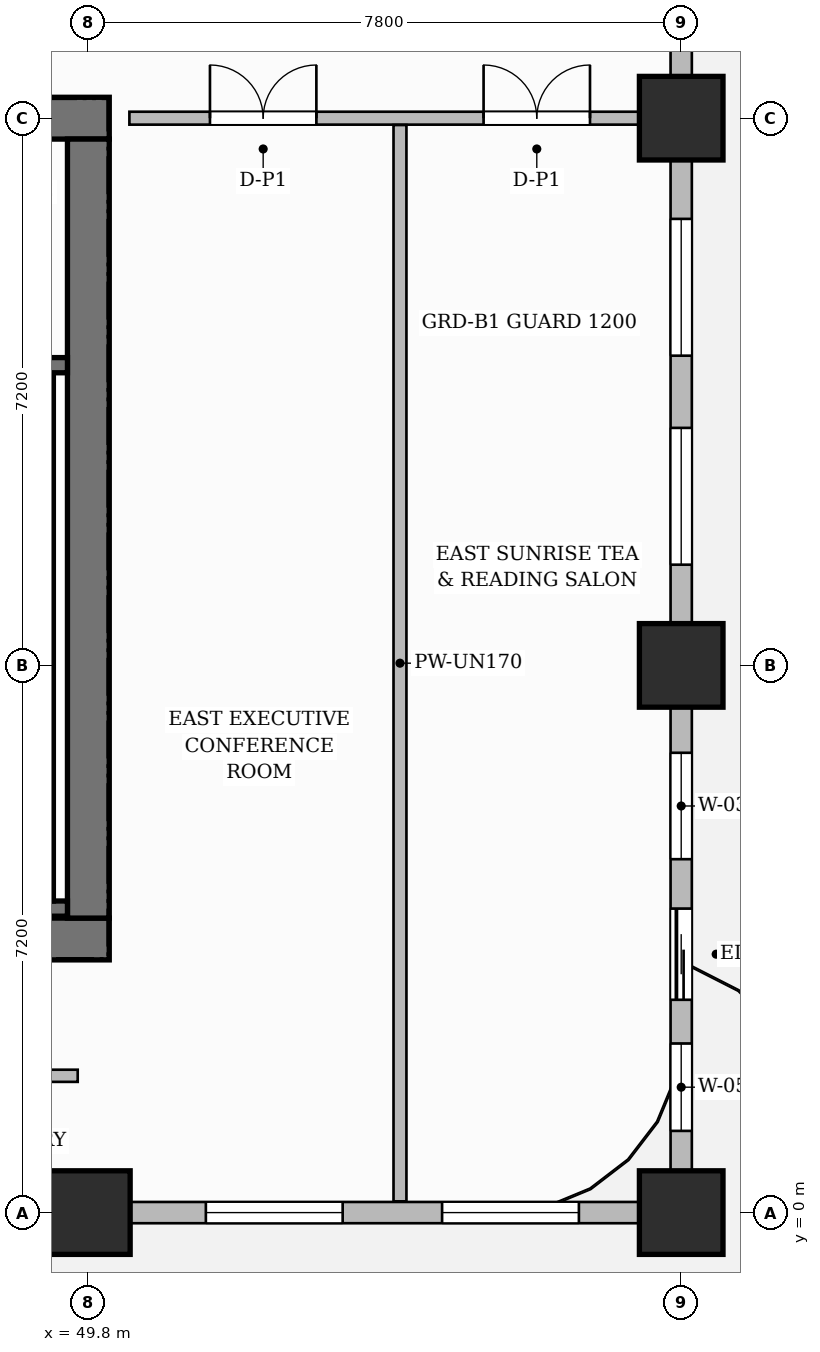
"""IFC4 building model, lengths in metres.
Left out: names, types, materials, properties, quantities, classifications, styles, units other than length and angle.
Written with IfcOpenShell. Run it as: python <this file> out.ifc"""

import sys

from ifc_helpers import new_model, si_unit, direction, frame, frame_2d, origin, origin_2d, place, context, subcontext, project, spatial, rectangle, extrude, source, transform, mapped, element, fill, save


model = new_model("IFC4")
c1 = context("Model", 3, precision=1e-05, world=origin(), true_north=direction((0.0, 1.0)))
c2 = subcontext(c1, "Body", "Model", "MODEL_VIEW")
j1 = project(units=[si_unit("LENGTHUNIT", "METRE"), si_unit("PLANEANGLEUNIT", "RADIAN")], contexts=[c1])
p1 = place(None, origin())
s1 = spatial("IfcSite", under=j1, at=p1, CompositionType="ELEMENT")
p2 = place(p1, origin())
s2 = spatial("IfcBuilding", under=s1, at=p2, CompositionType="ELEMENT")
p3 = place(p2, frame((0.0, 0.0, 102.7)))
s3 = spatial("IfcBuildingStorey", under=s2, at=p3, CompositionType="ELEMENT", Elevation=102.7)
p4 = place(p3, frame((34.525, 3.6, 0.0), z_axis=(0.0, 0.0, 1.0), x_axis=(1.0, 0.0, 0.0)))
e1 = element("IfcWall", 1, at=p4, inside=s3, PredefinedType="SHEAR", context=c2, shape_type="SweptSolid", body=[
    extrude(rectangle(XDim=15.55, YDim=0.55, at=frame_2d((7.775, 0.0))), origin(), (0.0, 0.0, 1.0), 3.7),
])
p5 = place(p4, frame((4.825, 0.0, 0.0)))
e2 = element("IfcOpeningElement", 2, at=p5, cuts=e1, PredefinedType="OPENING", context=c2, shape_type="SweptSolid", body=[
    extrude(rectangle(XDim=0.9, YDim=2.1, at=frame_2d((0.45, 1.05))), frame((0.0, 0.285, 0.0), z_axis=(0.0, -1.0, 0.0), x_axis=(1.0, 0.0, 0.0)), (0.0, 0.0, 1.0), 0.57),
])
p6 = place(p4, frame((7.245, 0.0, 0.0)))
e3 = element("IfcOpeningElement", 3, at=p6, cuts=e1, PredefinedType="OPENING", context=c2, shape_type="SweptSolid", body=[
    extrude(rectangle(XDim=0.9, YDim=2.1, at=frame_2d((0.45, 1.05))), frame((0.0, 0.285, 0.0), z_axis=(0.0, -1.0, 0.0), x_axis=(1.0, 0.0, 0.0)), (0.0, 0.0, 1.0), 0.57),
])
p7 = place(p3, frame((34.525, 14.4, 0.0), z_axis=(0.0, 0.0, 1.0), x_axis=(1.0, 0.0, 0.0)))
e4 = element("IfcWall", 4, at=p7, inside=s3, PredefinedType="SHEAR", context=c2, shape_type="SweptSolid", body=[
    extrude(rectangle(XDim=15.55, YDim=0.55, at=frame_2d((7.775, 0.0))), origin(), (0.0, 0.0, 1.0), 3.7),
])
p8 = place(p7, frame((5.405, 0.0, 0.0)))
e5 = element("IfcOpeningElement", 5, at=p8, cuts=e4, PredefinedType="OPENING", context=c2, shape_type="SweptSolid", body=[
    extrude(rectangle(XDim=1.5, YDim=2.2, at=frame_2d((0.75, 1.1))), frame((0.0, 0.285, 0.0), z_axis=(0.0, -1.0, 0.0), x_axis=(1.0, 0.0, 0.0)), (0.0, 0.0, 1.0), 0.57),
])
p9 = place(p7, frame((1.62, 0.0, 0.0)))
e6 = element("IfcOpeningElement", 6, at=p9, cuts=e4, PredefinedType="OPENING", context=c2, shape_type="SweptSolid", body=[
    extrude(rectangle(XDim=1.05, YDim=2.15, at=frame_2d((0.525, 1.075))), frame((0.0, 0.285, 0.0), z_axis=(0.0, -1.0, 0.0), x_axis=(1.0, 0.0, 0.0)), (0.0, 0.0, 1.0), 0.57),
])
p10 = place(p7, frame((11.25, 0.0, 0.0)))
e7 = element("IfcOpeningElement", 7, at=p10, cuts=e4, PredefinedType="OPENING", context=c2, shape_type="SweptSolid", body=[
    extrude(rectangle(XDim=1.05, YDim=2.15, at=frame_2d((0.525, 1.075))), frame((0.0, 0.285, 0.0), z_axis=(0.0, -1.0, 0.0), x_axis=(1.0, 0.0, 0.0)), (0.0, 0.0, 1.0), 0.57),
])
p11 = place(p3, frame((49.8, 3.875, 0.0), z_axis=(0.0, 0.0, 1.0), x_axis=(0.0, 1.0, 0.0)))
e8 = element("IfcWall", 8, at=p11, inside=s3, PredefinedType="SHEAR", context=c2, shape_type="SweptSolid", body=[
    extrude(rectangle(XDim=10.25, YDim=0.55, at=frame_2d((5.125, 0.0))), origin(), (0.0, 0.0, 1.0), 3.7),
])
m1 = source(origin(), c2, "Body", "SweptSolid", [
    extrude(rectangle(XDim=1.1, YDim=1.1, at=origin_2d()), origin(), (0.0, 0.0, 1.0), 3.7),
])
for number, where, z_axis, x_axis in (
    (9, (49.8, 0.0, 0.0), (0.0, 0.0, 1.0), (1.0, 0.0, 0.0)),
    (10, (57.6, 0.0, 0.0), (0.0, 0.0, 1.0), (1.0, 0.0, 0.0)),
    (11, (57.6, 7.2, 0.0), (0.0, 0.0, 1.0), (1.0, 0.0, 0.0)),
    (12, (57.6, 14.4, 0.0), (0.0, 0.0, 1.0), (1.0, 0.0, 0.0)),
):
    element("IfcColumn", number, at=place(p3, frame(where, z_axis=z_axis, x_axis=x_axis)), inside=s3, PredefinedType="COLUMN", context=c2, shape_type="MappedRepresentation", body=[
        mapped(m1, transform((0.0, 0.0, 0.0), scale=1.0)),
    ])
p12 = place(p3, frame((43.12, 4.0, 0.0), z_axis=(0.0, 0.0, 1.0), x_axis=(1.0, 0.0, 0.0)))
e13 = element("IfcWall", 13, at=p12, inside=s3, PredefinedType="SHEAR", context=c2, shape_type="SweptSolid", body=[
    extrude(rectangle(XDim=6.405, YDim=0.2, at=frame_2d((3.202, 0.0))), origin(), (0.0, 0.0, 1.0), 3.7),
])
p13 = place(p3, frame((49.24, 4.1, 0.0), z_axis=(0.0, 0.0, 1.0), x_axis=(0.0, 1.0, 0.0)))
e14 = element("IfcWall", 14, at=p13, inside=s3, PredefinedType="SHEAR", context=c2, shape_type="SweptSolid", body=[
    extrude(rectangle(XDim=6.95, YDim=0.2, at=frame_2d((3.475, 0.0))), origin(), (0.0, 0.0, 1.0), 3.7),
])
p14 = place(p3, frame((43.12, 11.15, 0.0), z_axis=(0.0, 0.0, 1.0), x_axis=(1.0, 0.0, 0.0)))
e15 = element("IfcWall", 15, at=p14, inside=s3, PredefinedType="SHEAR", context=c2, shape_type="SweptSolid", body=[
    extrude(rectangle(XDim=6.405, YDim=0.2, at=frame_2d((3.202, 0.0))), origin(), (0.0, 0.0, 1.0), 3.7),
])
p15 = place(p14, frame((1.045, 0.0, 0.0)))
e16 = element("IfcOpeningElement", 16, at=p15, cuts=e15, PredefinedType="OPENING", context=c2, shape_type="SweptSolid", body=[
    extrude(rectangle(XDim=1.05, YDim=2.2, at=frame_2d((0.525, 1.1))), frame((0.0, 0.11, 0.0), z_axis=(0.0, -1.0, 0.0), x_axis=(1.0, 0.0, 0.0)), (0.0, 0.0, 1.0), 0.22),
])
p16 = place(p14, frame((4.125, 0.0, 0.0)))
e17 = element("IfcOpeningElement", 17, at=p16, cuts=e15, PredefinedType="OPENING", context=c2, shape_type="SweptSolid", body=[
    extrude(rectangle(XDim=1.05, YDim=2.2, at=frame_2d((0.525, 1.1))), frame((0.0, 0.11, 0.0), z_axis=(0.0, -1.0, 0.0), x_axis=(1.0, 0.0, 0.0)), (0.0, 0.0, 1.0), 0.22),
])
p17 = place(p3, frame((30.29, 1.8, 0.0), z_axis=(0.0, 0.0, 1.0), x_axis=(1.0, 0.0, 0.0)))
e18 = element("IfcWall", 18, at=p17, inside=s3, PredefinedType="PARTITIONING", context=c2, shape_type="SweptSolid", body=[
    extrude(rectangle(XDim=19.37, YDim=0.16, at=frame_2d((9.685, 0.0))), origin(), (0.0, 0.0, 1.0), 3.4),
])
p18 = place(p17, frame((5.213, 0.0, 0.0)))
e19 = element("IfcOpeningElement", 19, at=p18, cuts=e18, PredefinedType="OPENING", context=c2, shape_type="SweptSolid", body=[
    extrude(rectangle(XDim=0.9, YDim=2.15, at=frame_2d((0.45, 1.075))), frame((0.0, 0.09, 0.0), z_axis=(0.0, -1.0, 0.0), x_axis=(1.0, 0.0, 0.0)), (0.0, 0.0, 1.0), 0.18),
])
p19 = place(p17, frame((14.06, 0.0, 0.0)))
e20 = element("IfcOpeningElement", 20, at=p19, cuts=e18, PredefinedType="OPENING", context=c2, shape_type="SweptSolid", body=[
    extrude(rectangle(XDim=0.9, YDim=2.15, at=frame_2d((0.45, 1.075))), frame((0.0, 0.09, 0.0), z_axis=(0.0, -1.0, 0.0), x_axis=(1.0, 0.0, 0.0)), (0.0, 0.0, 1.0), 0.18),
])
p20 = place(p3, frame((50.34, 14.4, 0.0), z_axis=(0.0, 0.0, 1.0), x_axis=(1.0, 0.0, 0.0)))
e21 = element("IfcWall", 21, at=p20, inside=s3, PredefinedType="PARTITIONING", context=c2, shape_type="SweptSolid", body=[
    extrude(rectangle(XDim=7.07, YDim=0.17, at=frame_2d((3.535, 0.0))), origin(), (0.0, 0.0, 1.0), 2.835),
])
p21 = place(p20, frame((1.06, 0.0, 0.0)))
e22 = element("IfcOpeningElement", 22, at=p21, cuts=e21, PredefinedType="OPENING", context=c2, shape_type="SweptSolid", body=[
    extrude(rectangle(XDim=1.4, YDim=2.35, at=frame_2d((0.7, 1.175))), frame((0.0, 0.095, 0.0), z_axis=(0.0, -1.0, 0.0), x_axis=(1.0, 0.0, 0.0)), (0.0, 0.0, 1.0), 0.19),
])
p22 = place(p20, frame((4.66, 0.0, 0.0)))
e23 = element("IfcOpeningElement", 23, at=p22, cuts=e21, PredefinedType="OPENING", context=c2, shape_type="SweptSolid", body=[
    extrude(rectangle(XDim=1.4, YDim=2.35, at=frame_2d((0.7, 1.175))), frame((0.0, 0.095, 0.0), z_axis=(0.0, -1.0, 0.0), x_axis=(1.0, 0.0, 0.0)), (0.0, 0.0, 1.0), 0.19),
])
p23 = place(p3, frame((53.9, 0.148, 0.0), z_axis=(0.0, 0.0, 1.0), x_axis=(0.0, 1.0, 0.0)))
e24 = element("IfcWall", 24, at=p23, inside=s3, PredefinedType="PARTITIONING", context=c2, shape_type="SweptSolid", body=[
    extrude(rectangle(XDim=14.162, YDim=0.17, at=frame_2d((7.081, 0.0))), origin(), (0.0, 0.0, 1.0), 3.025),
])
p24 = place(p3, frame((14.4, 0.0, 0.0), z_axis=(0.0, 0.0, 1.0), x_axis=(1.0, 0.0, 0.0)))
e25 = element("IfcWall", 25, at=p24, inside=s3, PredefinedType="SOLIDWALL", context=c2, shape_type="SweptSolid", body=[
    extrude(rectangle(XDim=43.2, YDim=0.28, at=frame_2d((21.6, 0.0))), origin(), (0.0, 0.0, 1.0), 2.835),
])
p25 = place(p24, frame((0.85, 0.0, 0.0)))
e26 = element("IfcOpeningElement", 26, at=p25, cuts=e25, PredefinedType="OPENING", context=c2, shape_type="SweptSolid", body=[
    extrude(rectangle(XDim=1.2, YDim=2.2, at=frame_2d((0.6, 1.1))), frame((0.0, 0.15, 0.0), z_axis=(0.0, -1.0, 0.0), x_axis=(1.0, 0.0, 0.0)), (0.0, 0.0, 1.0), 0.3),
])
p26 = place(p24, frame((2.746, 0.0, 0.8)))
e27 = element("IfcOpeningElement", 27, at=p26, cuts=e25, PredefinedType="OPENING", context=c2, shape_type="SweptSolid", body=[
    extrude(rectangle(XDim=1.15, YDim=1.8, at=frame_2d((0.575, 0.9))), frame((0.0, 0.15, 0.0), z_axis=(0.0, -1.0, 0.0), x_axis=(1.0, 0.0, 0.0)), (0.0, 0.0, 1.0), 0.3),
])
p27 = place(p24, frame((4.654, 0.0, 0.8)))
e28 = element("IfcOpeningElement", 28, at=p27, cuts=e25, PredefinedType="OPENING", context=c2, shape_type="SweptSolid", body=[
    extrude(rectangle(XDim=1.4, YDim=1.85, at=frame_2d((0.7, 0.925))), frame((0.0, 0.15, 0.0), z_axis=(0.0, -1.0, 0.0), x_axis=(1.0, 0.0, 0.0)), (0.0, 0.0, 1.0), 0.3),
])
p28 = place(p24, frame((8.181, 0.0, 0.8)))
e29 = element("IfcOpeningElement", 29, at=p28, cuts=e25, PredefinedType="OPENING", context=c2, shape_type="SweptSolid", body=[
    extrude(rectangle(XDim=0.95, YDim=1.75, at=frame_2d((0.475, 0.875))), frame((0.0, 0.15, 0.0), z_axis=(0.0, -1.0, 0.0), x_axis=(1.0, 0.0, 0.0)), (0.0, 0.0, 1.0), 0.3),
])
p29 = place(p24, frame((10.564, 0.0, 0.8)))
e30 = element("IfcOpeningElement", 30, at=p29, cuts=e25, PredefinedType="OPENING", context=c2, shape_type="SweptSolid", body=[
    extrude(rectangle(XDim=1.8, YDim=1.85, at=frame_2d((0.9, 0.925))), frame((0.0, 0.15, 0.0), z_axis=(0.0, -1.0, 0.0), x_axis=(1.0, 0.0, 0.0)), (0.0, 0.0, 1.0), 0.3),
])
p30 = place(p24, frame((16.804, 0.0, 0.8)))
e31 = element("IfcOpeningElement", 31, at=p30, cuts=e25, PredefinedType="OPENING", context=c2, shape_type="SweptSolid", body=[
    extrude(rectangle(XDim=1.8, YDim=1.85, at=frame_2d((0.9, 0.925))), frame((0.0, 0.15, 0.0), z_axis=(0.0, -1.0, 0.0), x_axis=(1.0, 0.0, 0.0)), (0.0, 0.0, 1.0), 0.3),
])
p31 = place(p24, frame((22.396, 0.0, 0.8)))
e32 = element("IfcOpeningElement", 32, at=p31, cuts=e25, PredefinedType="OPENING", context=c2, shape_type="SweptSolid", body=[
    extrude(rectangle(XDim=1.8, YDim=1.85, at=frame_2d((0.9, 0.925))), frame((0.0, 0.15, 0.0), z_axis=(0.0, -1.0, 0.0), x_axis=(1.0, 0.0, 0.0)), (0.0, 0.0, 1.0), 0.3),
])
p32 = place(p24, frame((25.629, 0.0, 0.8)))
e33 = element("IfcOpeningElement", 33, at=p32, cuts=e25, PredefinedType="OPENING", context=c2, shape_type="SweptSolid", body=[
    extrude(rectangle(XDim=0.95, YDim=1.75, at=frame_2d((0.475, 0.875))), frame((0.0, 0.15, 0.0), z_axis=(0.0, -1.0, 0.0), x_axis=(1.0, 0.0, 0.0)), (0.0, 0.0, 1.0), 0.3),
])
p33 = place(p24, frame((29.075, 0.0, 0.8)))
e34 = element("IfcOpeningElement", 34, at=p33, cuts=e25, PredefinedType="OPENING", context=c2, shape_type="SweptSolid", body=[
    extrude(rectangle(XDim=1.8, YDim=1.85, at=frame_2d((0.9, 0.925))), frame((0.0, 0.15, 0.0), z_axis=(0.0, -1.0, 0.0), x_axis=(1.0, 0.0, 0.0)), (0.0, 0.0, 1.0), 0.3),
])
p34 = place(p24, frame((32.125, 0.0, 0.8)))
e35 = element("IfcOpeningElement", 35, at=p34, cuts=e25, PredefinedType="OPENING", context=c2, shape_type="SweptSolid", body=[
    extrude(rectangle(XDim=1.8, YDim=1.85, at=frame_2d((0.9, 0.925))), frame((0.0, 0.15, 0.0), z_axis=(0.0, -1.0, 0.0), x_axis=(1.0, 0.0, 0.0)), (0.0, 0.0, 1.0), 0.3),
])
p35 = place(p24, frame((36.946, 0.0, 0.8)))
e36 = element("IfcOpeningElement", 36, at=p35, cuts=e25, PredefinedType="OPENING", context=c2, shape_type="SweptSolid", body=[
    extrude(rectangle(XDim=1.8, YDim=1.85, at=frame_2d((0.9, 0.925))), frame((0.0, 0.15, 0.0), z_axis=(0.0, -1.0, 0.0), x_axis=(1.0, 0.0, 0.0)), (0.0, 0.0, 1.0), 0.3),
])
p36 = place(p24, frame((40.054, 0.0, 0.8)))
e37 = element("IfcOpeningElement", 37, at=p36, cuts=e25, PredefinedType="OPENING", context=c2, shape_type="SweptSolid", body=[
    extrude(rectangle(XDim=1.8, YDim=1.85, at=frame_2d((0.9, 0.925))), frame((0.0, 0.15, 0.0), z_axis=(0.0, -1.0, 0.0), x_axis=(1.0, 0.0, 0.0)), (0.0, 0.0, 1.0), 0.3),
])
p37 = place(p3, frame((57.6, 0.05, 0.0), z_axis=(0.0, 0.0, 1.0), x_axis=(0.0, 1.0, 0.0)))
e38 = element("IfcWall", 38, at=p37, inside=s3, PredefinedType="SOLIDWALL", context=c2, shape_type="SweptSolid", body=[
    extrude(rectangle(XDim=21.5, YDim=0.28, at=frame_2d((10.75, 0.0))), origin(), (0.0, 0.0, 1.0), 2.835),
])
p38 = place(p37, frame((2.75, 0.0, 0.0)))
e39 = element("IfcOpeningElement", 39, at=p38, cuts=e38, PredefinedType="OPENING", context=c2, shape_type="SweptSolid", body=[
    extrude(rectangle(XDim=1.2, YDim=2.2, at=frame_2d((0.6, 1.1))), frame((0.0, 0.15, 0.0), z_axis=(0.0, -1.0, 0.0), x_axis=(1.0, 0.0, 0.0)), (0.0, 0.0, 1.0), 0.3),
])
p39 = place(p37, frame((1.025, 0.0, 0.8)))
e40 = element("IfcOpeningElement", 40, at=p39, cuts=e38, PredefinedType="OPENING", context=c2, shape_type="SweptSolid", body=[
    extrude(rectangle(XDim=1.15, YDim=1.8, at=frame_2d((0.575, 0.9))), frame((0.0, 0.15, 0.0), z_axis=(0.0, -1.0, 0.0), x_axis=(1.0, 0.0, 0.0)), (0.0, 0.0, 1.0), 0.3),
])
p40 = place(p37, frame((4.6, 0.0, 0.8)))
e41 = element("IfcOpeningElement", 41, at=p40, cuts=e38, PredefinedType="OPENING", context=c2, shape_type="SweptSolid", body=[
    extrude(rectangle(XDim=1.4, YDim=1.85, at=frame_2d((0.7, 0.925))), frame((0.0, 0.15, 0.0), z_axis=(0.0, -1.0, 0.0), x_axis=(1.0, 0.0, 0.0)), (0.0, 0.0, 1.0), 0.3),
])
p41 = place(p37, frame((8.475, 0.0, 0.8)))
e42 = element("IfcOpeningElement", 42, at=p41, cuts=e38, PredefinedType="OPENING", context=c2, shape_type="SweptSolid", body=[
    extrude(rectangle(XDim=1.8, YDim=1.85, at=frame_2d((0.9, 0.925))), frame((0.0, 0.15, 0.0), z_axis=(0.0, -1.0, 0.0), x_axis=(1.0, 0.0, 0.0)), (0.0, 0.0, 1.0), 0.3),
])
p42 = place(p37, frame((11.225, 0.0, 0.8)))
e43 = element("IfcOpeningElement", 43, at=p42, cuts=e38, PredefinedType="OPENING", context=c2, shape_type="SweptSolid", body=[
    extrude(rectangle(XDim=1.8, YDim=1.85, at=frame_2d((0.9, 0.925))), frame((0.0, 0.15, 0.0), z_axis=(0.0, -1.0, 0.0), x_axis=(1.0, 0.0, 0.0)), (0.0, 0.0, 1.0), 0.3),
])
p43 = place(p37, frame((15.471, 0.0, 0.8)))
e44 = element("IfcOpeningElement", 44, at=p43, cuts=e38, PredefinedType="OPENING", context=c2, shape_type="SweptSolid", body=[
    extrude(rectangle(XDim=1.15, YDim=1.8, at=frame_2d((0.575, 0.9))), frame((0.0, 0.15, 0.0), z_axis=(0.0, -1.0, 0.0), x_axis=(1.0, 0.0, 0.0)), (0.0, 0.0, 1.0), 0.3),
])
p44 = place(p37, frame((17.954, 0.0, 0.8)))
e45 = element("IfcOpeningElement", 45, at=p44, cuts=e38, PredefinedType="OPENING", context=c2, shape_type="SweptSolid", body=[
    extrude(rectangle(XDim=1.8, YDim=1.85, at=frame_2d((0.9, 0.925))), frame((0.0, 0.15, 0.0), z_axis=(0.0, -1.0, 0.0), x_axis=(1.0, 0.0, 0.0)), (0.0, 0.0, 1.0), 0.3),
])
m2 = source(origin(), c2, "Body", "SweptSolid", [
    extrude(rectangle(XDim=1.4, YDim=2.35, at=frame_2d((0.7, 1.175))), frame((0.0, 0.025, 0.0), z_axis=(0.0, -1.0, 0.0), x_axis=(1.0, 0.0, 0.0)), (0.0, 0.0, 1.0), 0.05),
])
p45 = place(p21, origin())
e46 = element("IfcDoor", 46, at=p45, inside=s3, OperationType="DOUBLE_DOOR_SINGLE_SWING", PredefinedType="DOOR", context=c2, shape_type="MappedRepresentation", body=[
    mapped(m2, transform((0.0, 0.0, 0.0), scale=1.0)),
])
fill(e22, e46)
p46 = place(p22, origin())
e47 = element("IfcDoor", 47, at=p46, inside=s3, OperationType="DOUBLE_DOOR_SINGLE_SWING", PredefinedType="DOOR", context=c2, shape_type="MappedRepresentation", body=[
    mapped(m2, transform((0.0, 0.0, 0.0), scale=1.0)),
])
fill(e23, e47)
m3 = source(origin(), c2, "Body", "SweptSolid", [
    extrude(rectangle(XDim=1.2, YDim=2.2, at=frame_2d((0.6, 1.1))), frame((0.0, 0.025, 0.0), z_axis=(0.0, -1.0, 0.0), x_axis=(1.0, 0.0, 0.0)), (0.0, 0.0, 1.0), 0.05),
])
p47 = place(p38, origin())
e48 = element("IfcDoor", 48, at=p47, inside=s3, OperationType="SLIDING_TO_LEFT", PredefinedType="DOOR", context=c2, shape_type="MappedRepresentation", body=[
    mapped(m3, transform((0.0, 0.0, 0.0), scale=1.0)),
])
fill(e39, e48)
m4 = source(origin(), c2, "Body", "SweptSolid", [
    extrude(rectangle(XDim=1.8, YDim=1.85, at=frame_2d((0.9, 0.925))), frame((0.0, 0.03, 0.0), z_axis=(0.0, -1.0, 0.0), x_axis=(1.0, 0.0, 0.0)), (0.0, 0.0, 1.0), 0.06),
])
p48 = place(p35, origin())
e49 = element("IfcWindow", 49, at=p48, inside=s3, PartitioningType="DOUBLE_PANEL_VERTICAL", PredefinedType="WINDOW", context=c2, shape_type="MappedRepresentation", body=[
    mapped(m4, transform((0.0, 0.0, 0.0), scale=1.0)),
])
fill(e36, e49)
p49 = place(p36, origin())
e50 = element("IfcWindow", 50, at=p49, inside=s3, PartitioningType="DOUBLE_PANEL_VERTICAL", PredefinedType="WINDOW", context=c2, shape_type="MappedRepresentation", body=[
    mapped(m4, transform((0.0, 0.0, 0.0), scale=1.0)),
])
fill(e37, e50)
m5 = source(origin(), c2, "Body", "SweptSolid", [
    extrude(rectangle(XDim=1.15, YDim=1.8, at=frame_2d((0.575, 0.9))), frame((0.0, 0.03, 0.0), z_axis=(0.0, -1.0, 0.0), x_axis=(1.0, 0.0, 0.0)), (0.0, 0.0, 1.0), 0.06),
])
p50 = place(p39, origin())
e51 = element("IfcWindow", 51, at=p50, inside=s3, PartitioningType="SINGLE_PANEL", PredefinedType="WINDOW", context=c2, shape_type="MappedRepresentation", body=[
    mapped(m5, transform((0.0, 0.0, 0.0), scale=1.0)),
])
fill(e40, e51)
m6 = source(origin(), c2, "Body", "SweptSolid", [
    extrude(rectangle(XDim=1.4, YDim=1.85, at=frame_2d((0.7, 0.925))), frame((0.0, 0.03, 0.0), z_axis=(0.0, -1.0, 0.0), x_axis=(1.0, 0.0, 0.0)), (0.0, 0.0, 1.0), 0.06),
])
p51 = place(p40, origin())
e52 = element("IfcWindow", 52, at=p51, inside=s3, PartitioningType="SINGLE_PANEL", PredefinedType="WINDOW", context=c2, shape_type="MappedRepresentation", body=[
    mapped(m6, transform((0.0, 0.0, 0.0), scale=1.0)),
])
fill(e41, e52)
p52 = place(p41, origin())
e53 = element("IfcWindow", 53, at=p52, inside=s3, PartitioningType="DOUBLE_PANEL_VERTICAL", PredefinedType="WINDOW", context=c2, shape_type="MappedRepresentation", body=[
    mapped(m4, transform((0.0, 0.0, 0.0), scale=1.0)),
])
fill(e42, e53)
p53 = place(p42, origin())
e54 = element("IfcWindow", 54, at=p53, inside=s3, PartitioningType="DOUBLE_PANEL_VERTICAL", PredefinedType="WINDOW", context=c2, shape_type="MappedRepresentation", body=[
    mapped(m4, transform((0.0, 0.0, 0.0), scale=1.0)),
])
fill(e43, e54)
save(model, sys.argv[1])
